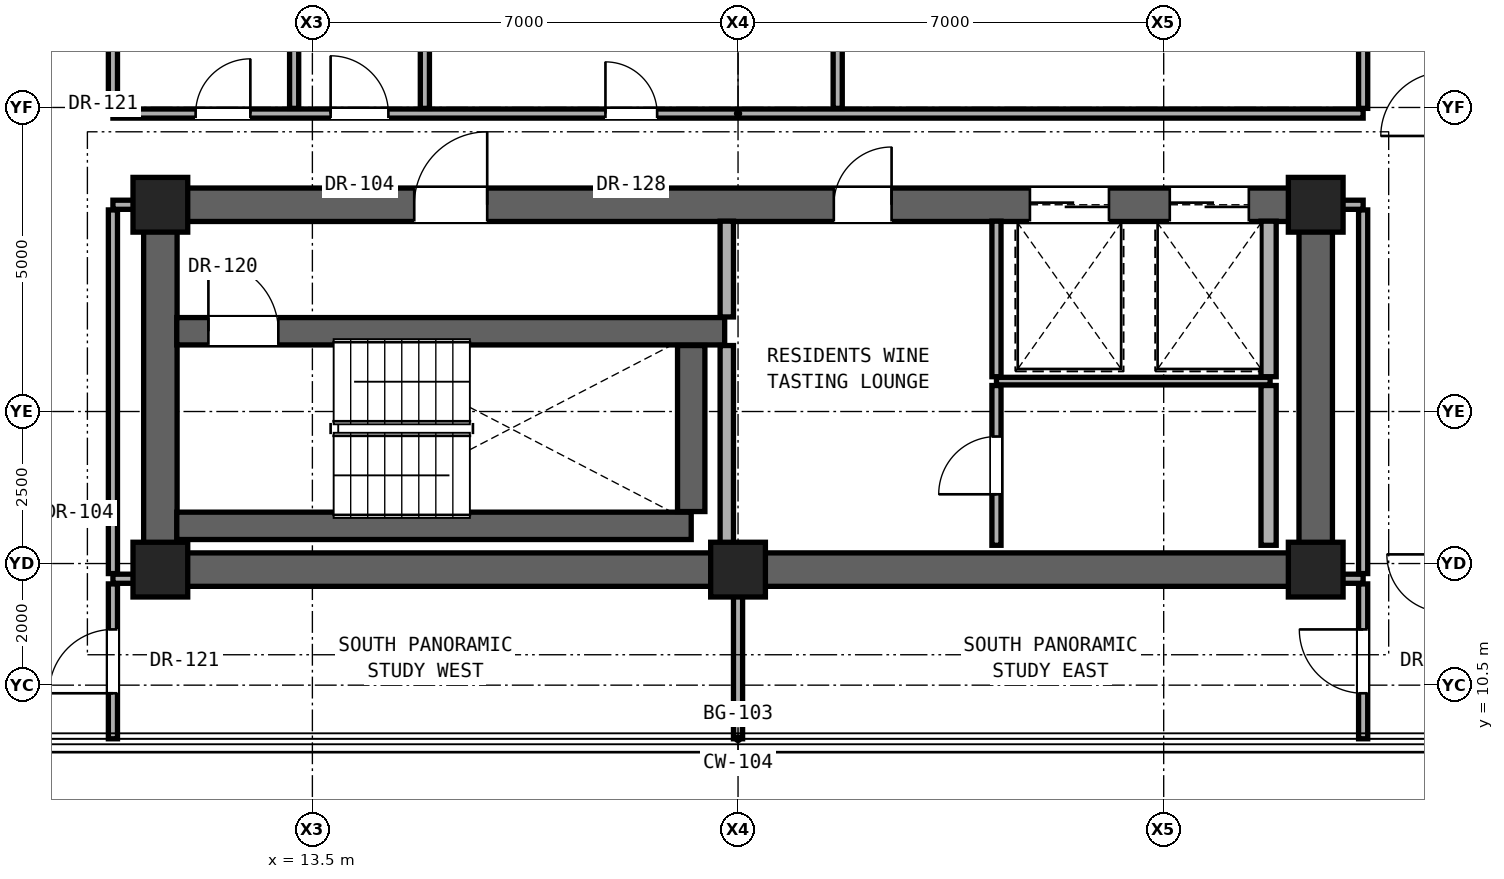
"""IFC4 building model, lengths in metres.
Left out: names, types, materials, properties, quantities, classifications, styles, units other than length and angle.
Written with IfcOpenShell. Run it as: python <this file> out.ifc"""

import sys

from ifc_helpers import new_model, si_unit, direction, frame, frame_2d, origin, origin_2d, place, context, subcontext, project, spatial, rectangle, extrude, element, fill, save


model = new_model("IFC4")
c1 = context("Model", 3, precision=1e-05, world=origin(), true_north=direction((0.0, 1.0)))
c2 = subcontext(c1, "Body", "Model", "MODEL_VIEW")
j1 = project(units=[si_unit("LENGTHUNIT", "METRE"), si_unit("PLANEANGLEUNIT", "RADIAN")], contexts=[c1])
p1 = place(None, origin())
s1 = spatial("IfcSite", under=j1, at=p1, CompositionType="ELEMENT")
p2 = place(p1, origin())
s2 = spatial("IfcBuilding", under=s1, at=p2, CompositionType="ELEMENT")
p3 = place(p2, frame((0.0, 0.0, 196.65)))
s3 = spatial("IfcBuildingStorey", under=s2, at=p3, CompositionType="ELEMENT", Elevation=196.65)
for number, where, z_axis, x_axis in (
    (1, (11.0, 12.4, 0.0), (0.0, 0.0, 1.0), (1.0, 0.0, 0.0)),
    (2, (20.5, 12.4, 0.0), (0.0, 0.0, 1.0), (1.0, 0.0, 0.0)),
    (3, (30.0, 12.4, 0.0), (0.0, 0.0, 1.0), (1.0, 0.0, 0.0)),
    (4, (11.0, 18.4, 0.0), (0.0, 0.0, 1.0), (1.0, 0.0, 0.0)),
    (5, (30.0, 18.4, 0.0), (0.0, 0.0, 1.0), (1.0, 0.0, 0.0)),
):
    element("IfcColumn", number, at=place(p3, frame(where, z_axis=z_axis, x_axis=x_axis)), inside=s3, PredefinedType="COLUMN", context=c2, shape_type="SweptSolid", body=[
        extrude(rectangle(XDim=0.9, YDim=0.9, at=origin_2d()), origin(), (0.0, 0.0, 1.0), 3.25),
    ])
p4 = place(p3, frame((11.0, 12.4, 0.0), z_axis=(0.0, 0.0, 1.0), x_axis=(1.0, 0.0, 0.0)))
e6 = element("IfcWall", 6, at=p4, inside=s3, PredefinedType="SHEAR", context=c2, shape_type="SweptSolid", body=[
    extrude(rectangle(XDim=19.0, YDim=0.55, at=frame_2d((9.5, 0.0))), origin(), (0.0, 0.0, 1.0), 3.05),
])
for number, where, z_axis, x_axis in (
    (7, (11.0, 12.4, 0.0), (0.0, 0.0, 1.0), (0.0, 1.0, 0.0)),
    (8, (30.0, 12.4, 0.0), (0.0, 0.0, 1.0), (0.0, 1.0, 0.0)),
):
    element("IfcWall", number, at=place(p3, frame(where, z_axis=z_axis, x_axis=x_axis)), inside=s3, PredefinedType="SHEAR", context=c2, shape_type="SweptSolid", body=[
        extrude(rectangle(XDim=6.0, YDim=0.55, at=frame_2d((3.0, 0.0))), origin(), (0.0, 0.0, 1.0), 3.05),
    ])
p5 = place(p3, frame((11.0, 18.4, 0.0), z_axis=(0.0, 0.0, 1.0), x_axis=(1.0, 0.0, 0.0)))
e9 = element("IfcWall", 9, at=p5, inside=s3, PredefinedType="SHEAR", context=c2, shape_type="SweptSolid", body=[
    extrude(rectangle(XDim=19.0, YDim=0.55, at=frame_2d((9.5, 0.0))), origin(), (0.0, 0.0, 1.0), 3.05),
])
p6 = place(p5, frame((4.175, 0.0, 0.0)))
e10 = element("IfcOpeningElement", 10, at=p6, cuts=e9, PredefinedType="OPENING", context=c2, shape_type="SweptSolid", body=[
    extrude(rectangle(XDim=1.2, YDim=2.25, at=frame_2d((0.6, 1.125))), frame((0.0, 0.285, 0.0), z_axis=(0.0, -1.0, 0.0), x_axis=(1.0, 0.0, 0.0)), (0.0, 0.0, 1.0), 0.57),
])
p7 = place(p5, frame((11.075, 0.0, 0.0)))
e11 = element("IfcOpeningElement", 11, at=p7, cuts=e9, PredefinedType="OPENING", context=c2, shape_type="SweptSolid", body=[
    extrude(rectangle(XDim=0.95, YDim=2.15, at=frame_2d((0.475, 1.075))), frame((0.0, 0.285, 0.0), z_axis=(0.0, -1.0, 0.0), x_axis=(1.0, 0.0, 0.0)), (0.0, 0.0, 1.0), 0.57),
])
p8 = place(p5, frame((14.3, 0.0, 0.0)))
e12 = element("IfcOpeningElement", 12, at=p8, cuts=e9, PredefinedType="OPENING", context=c2, shape_type="SweptSolid", body=[
    extrude(rectangle(XDim=1.3, YDim=2.3, at=frame_2d((0.65, 1.15))), frame((0.0, 0.285, 0.0), z_axis=(0.0, -1.0, 0.0), x_axis=(1.0, 0.0, 0.0)), (0.0, 0.0, 1.0), 0.57),
])
p9 = place(p5, frame((16.6, 0.0, 0.0)))
e13 = element("IfcOpeningElement", 13, at=p9, cuts=e9, PredefinedType="OPENING", context=c2, shape_type="SweptSolid", body=[
    extrude(rectangle(XDim=1.3, YDim=2.3, at=frame_2d((0.65, 1.15))), frame((0.0, 0.285, 0.0), z_axis=(0.0, -1.0, 0.0), x_axis=(1.0, 0.0, 0.0)), (0.0, 0.0, 1.0), 0.57),
])
for number, where, z_axis, x_axis in (
    (14, (10.22, 12.25, 0.0), (0.0, 0.0, 1.0), (1.0, 0.0, 0.0)),
    (15, (30.27, 12.25, 0.0), (0.0, 0.0, 1.0), (1.0, 0.0, 0.0)),
):
    element("IfcWall", number, at=place(p3, frame(where, z_axis=z_axis, x_axis=x_axis)), inside=s3, PredefinedType="PARTITIONING", context=c2, shape_type="SweptSolid", body=[
        extrude(rectangle(XDim=0.51, YDim=0.15, at=frame_2d((0.255, 0.0))), origin(), (0.0, 0.0, 1.0), 3.05),
    ])
p10 = place(p3, frame((11.27, 13.12, 0.0), z_axis=(0.0, 0.0, 1.0), x_axis=(1.0, 0.0, 0.0)))
e16 = element("IfcWall", 16, at=p10, inside=s3, PredefinedType="SHEAR", context=c2, shape_type="SweptSolid", body=[
    extrude(rectangle(XDim=8.46, YDim=0.45, at=frame_2d((4.23, 0.0))), origin(), (0.0, 0.0, 1.0), 3.05),
])
p11 = place(p3, frame((24.75, 15.5, 0.0), z_axis=(0.0, 0.0, 1.0), x_axis=(1.0, 0.0, 0.0)))
e17 = element("IfcWall", 17, at=p11, inside=s3, PredefinedType="PARTITIONING", context=c2, shape_type="SweptSolid", body=[
    extrude(rectangle(XDim=4.5, YDim=0.125, at=frame_2d((2.25, 0.0))), origin(), (0.0, 0.0, 1.0), 3.05),
])
p12 = place(p3, frame((11.27, 16.32, 0.0), z_axis=(0.0, 0.0, 1.0), x_axis=(1.0, 0.0, 0.0)))
e18 = element("IfcWall", 18, at=p12, inside=s3, PredefinedType="SHEAR", context=c2, shape_type="SweptSolid", body=[
    extrude(rectangle(XDim=9.01, YDim=0.45, at=frame_2d((4.505, 0.0))), origin(), (0.0, 0.0, 1.0), 3.05),
])
p13 = place(p12, frame((0.52, 0.0, 0.0)))
e19 = element("IfcOpeningElement", 19, at=p13, cuts=e18, PredefinedType="OPENING", context=c2, shape_type="SweptSolid", body=[
    extrude(rectangle(XDim=1.15, YDim=2.2, at=frame_2d((0.575, 1.1))), frame((0.0, 0.235, 0.0), z_axis=(0.0, -1.0, 0.0), x_axis=(1.0, 0.0, 0.0)), (0.0, 0.0, 1.0), 0.47),
])
for number, where, z_axis, x_axis in (
    (20, (10.22, 18.4, 0.0), (0.0, 0.0, 1.0), (1.0, 0.0, 0.0)),
    (21, (30.27, 18.4, 0.0), (0.0, 0.0, 1.0), (1.0, 0.0, 0.0)),
):
    element("IfcWall", number, at=place(p3, frame(where, z_axis=z_axis, x_axis=x_axis)), inside=s3, PredefinedType="PARTITIONING", context=c2, shape_type="SweptSolid", body=[
        extrude(rectangle(XDim=0.51, YDim=0.15, at=frame_2d((0.255, 0.0))), origin(), (0.0, 0.0, 1.0), 2.442),
    ])
p14 = place(p3, frame((10.22, 19.9, 0.0), z_axis=(0.0, 0.0, 1.0), x_axis=(1.0, 0.0, 0.0)))
e22 = element("IfcWall", 22, at=p14, inside=s3, PredefinedType="PARTITIONING", context=c2, shape_type="SweptSolid", body=[
    extrude(rectangle(XDim=20.56, YDim=0.15, at=frame_2d((10.28, 0.0))), origin(), (0.0, 0.0, 1.0), 2.186),
])
p15 = place(p14, frame((1.36, 0.0, 0.0)))
e23 = element("IfcOpeningElement", 23, at=p15, cuts=e22, PredefinedType="OPENING", context=c2, shape_type="SweptSolid", body=[
    extrude(rectangle(XDim=0.9, YDim=2.1, at=frame_2d((0.45, 1.05))), frame((0.0, 0.085, 0.0), z_axis=(0.0, -1.0, 0.0), x_axis=(1.0, 0.0, 0.0)), (0.0, 0.0, 1.0), 0.17),
])
p16 = place(p14, frame((3.58, 0.0, 0.0)))
e24 = element("IfcOpeningElement", 24, at=p16, cuts=e22, PredefinedType="OPENING", context=c2, shape_type="SweptSolid", body=[
    extrude(rectangle(XDim=0.95, YDim=2.15, at=frame_2d((0.475, 1.075))), frame((0.0, 0.085, 0.0), z_axis=(0.0, -1.0, 0.0), x_axis=(1.0, 0.0, 0.0)), (0.0, 0.0, 1.0), 0.17),
])
p17 = place(p14, frame((8.1, 0.0, 0.0)))
e25 = element("IfcOpeningElement", 25, at=p17, cuts=e22, PredefinedType="OPENING", context=c2, shape_type="SweptSolid", body=[
    extrude(rectangle(XDim=0.85, YDim=2.01, at=frame_2d((0.425, 1.005))), frame((0.0, 0.085, 0.0), z_axis=(0.0, -1.0, 0.0), x_axis=(1.0, 0.0, 0.0)), (0.0, 0.0, 1.0), 0.17),
])
p18 = place(p3, frame((10.22, 9.618, 0.0), z_axis=(0.0, 0.0, 1.0), x_axis=(0.0, 1.0, 0.0)))
e26 = element("IfcWall", 26, at=p18, inside=s3, PredefinedType="PARTITIONING", context=c2, shape_type="SweptSolid", body=[
    extrude(rectangle(XDim=2.547, YDim=0.15, at=frame_2d((1.273, 0.0))), origin(), (0.0, 0.0, 1.0), 3.05),
])
p19 = place(p18, frame((0.749, 0.0, 0.0)))
e27 = element("IfcOpeningElement", 27, at=p19, cuts=e26, PredefinedType="OPENING", context=c2, shape_type="SweptSolid", body=[
    extrude(rectangle(XDim=1.05, YDim=2.2, at=frame_2d((0.525, 1.1))), frame((0.0, 0.085, 0.0), z_axis=(0.0, -1.0, 0.0), x_axis=(1.0, 0.0, 0.0)), (0.0, 0.0, 1.0), 0.17),
])
p20 = place(p3, frame((10.22, 12.335, 0.0), z_axis=(0.0, 0.0, 1.0), x_axis=(0.0, 1.0, 0.0)))
e28 = element("IfcWall", 28, at=p20, inside=s3, PredefinedType="PARTITIONING", context=c2, shape_type="SweptSolid", body=[
    extrude(rectangle(XDim=5.98, YDim=0.15, at=frame_2d((2.99, 0.0))), origin(), (0.0, 0.0, 1.0), 2.442),
])
for number, where, z_axis, x_axis in (
    (29, (10.22, 19.985, 0.0), (0.0, 0.0, 1.0), (0.0, 1.0, 0.0)),
    (30, (13.2, 19.985, 0.0), (0.0, 0.0, 1.0), (0.0, 1.0, 0.0)),
    (31, (15.35, 19.985, 0.0), (0.0, 0.0, 1.0), (0.0, 1.0, 0.0)),
):
    element("IfcWall", number, at=place(p3, frame(where, z_axis=z_axis, x_axis=x_axis)), inside=s3, PredefinedType="PARTITIONING", context=c2, shape_type="SweptSolid", body=[
        extrude(rectangle(XDim=2.78, YDim=0.15, at=frame_2d((1.39, 0.0))), origin(), (0.0, 0.0, 1.0), 3.05),
    ])
p21 = place(p3, frame((19.73, 13.355, 0.0), z_axis=(0.0, 0.0, 1.0), x_axis=(0.0, 1.0, 0.0)))
e32 = element("IfcWall", 32, at=p21, inside=s3, PredefinedType="SHEAR", context=c2, shape_type="SweptSolid", body=[
    extrude(rectangle(XDim=2.73, YDim=0.45, at=frame_2d((1.365, 0.0))), origin(), (0.0, 0.0, 1.0), 3.05),
])
p22 = place(p3, frame((20.315, 12.8, 0.0), z_axis=(0.0, 0.0, 1.0), x_axis=(0.0, 1.0, 0.0)))
e33 = element("IfcWall", 33, at=p22, inside=s3, PredefinedType="SOLIDWALL", context=c2, shape_type="SweptSolid", body=[
    extrude(rectangle(XDim=3.285, YDim=0.22, at=frame_2d((1.643, 0.0))), origin(), (0.0, 0.0, 1.0), 3.05),
])
p23 = place(p3, frame((20.315, 16.555, 0.0), z_axis=(0.0, 0.0, 1.0), x_axis=(0.0, 1.0, 0.0)))
e34 = element("IfcWall", 34, at=p23, inside=s3, PredefinedType="SOLIDWALL", context=c2, shape_type="SweptSolid", body=[
    extrude(rectangle(XDim=1.575, YDim=0.22, at=frame_2d((0.788, 0.0))), origin(), (0.0, 0.0, 1.0), 3.05),
])
p24 = place(p3, frame((20.5, 9.618, 0.0), z_axis=(0.0, 0.0, 1.0), x_axis=(0.0, 1.0, 0.0)))
e35 = element("IfcWall", 35, at=p24, inside=s3, PredefinedType="PARTITIONING", context=c2, shape_type="SweptSolid", body=[
    extrude(rectangle(XDim=2.512, YDim=0.15, at=frame_2d((1.256, 0.0))), origin(), (0.0, 0.0, 1.0), 3.05),
])
p25 = place(p3, frame((22.139, 19.985, 0.0), z_axis=(0.0, 0.0, 1.0), x_axis=(0.0, 1.0, 0.0)))
e36 = element("IfcWall", 36, at=p25, inside=s3, PredefinedType="PARTITIONING", context=c2, shape_type="SweptSolid", body=[
    extrude(rectangle(XDim=13.03, YDim=0.15, at=frame_2d((6.515, 0.0))), origin(), (0.0, 0.0, 1.0), 2.186),
])
p26 = place(p3, frame((24.75, 12.8, 0.0), z_axis=(0.0, 0.0, 1.0), x_axis=(0.0, 1.0, 0.0)))
e37 = element("IfcWall", 37, at=p26, inside=s3, PredefinedType="PARTITIONING", context=c2, shape_type="SweptSolid", body=[
    extrude(rectangle(XDim=2.627, YDim=0.15, at=frame_2d((1.314, 0.0))), origin(), (0.0, 0.0, 1.0), 3.05),
])
p27 = place(p26, frame((0.839, 0.0, 0.0)))
e38 = element("IfcOpeningElement", 38, at=p27, cuts=e37, PredefinedType="OPENING", context=c2, shape_type="SweptSolid", body=[
    extrude(rectangle(XDim=0.95, YDim=2.15, at=frame_2d((0.475, 1.075))), frame((0.0, 0.085, 0.0), z_axis=(0.0, -1.0, 0.0), x_axis=(1.0, 0.0, 0.0)), (0.0, 0.0, 1.0), 0.17),
])
p28 = place(p3, frame((24.75, 15.573, 0.0), z_axis=(0.0, 0.0, 1.0), x_axis=(0.0, 1.0, 0.0)))
e39 = element("IfcWall", 39, at=p28, inside=s3, PredefinedType="PARTITIONING", context=c2, shape_type="SweptSolid", body=[
    extrude(rectangle(XDim=2.557, YDim=0.15, at=frame_2d((1.279, 0.0))), origin(), (0.0, 0.0, 1.0), 3.05),
])
p29 = place(p3, frame((29.225, 12.8, 0.0), z_axis=(0.0, 0.0, 1.0), x_axis=(0.0, 1.0, 0.0)))
e40 = element("IfcWall", 40, at=p29, inside=s3, PredefinedType="SOLIDWALL", context=c2, shape_type="SweptSolid", body=[
    extrude(rectangle(XDim=2.627, YDim=0.25, at=frame_2d((1.314, 0.0))), origin(), (0.0, 0.0, 1.0), 3.05),
])
p30 = place(p3, frame((29.225, 15.573, 0.0), z_axis=(0.0, 0.0, 1.0), x_axis=(0.0, 1.0, 0.0)))
e41 = element("IfcWall", 41, at=p30, inside=s3, PredefinedType="SOLIDWALL", context=c2, shape_type="SweptSolid", body=[
    extrude(rectangle(XDim=2.557, YDim=0.25, at=frame_2d((1.279, 0.0))), origin(), (0.0, 0.0, 1.0), 3.05),
])
p31 = place(p3, frame((30.78, 9.618, 0.0), z_axis=(0.0, 0.0, 1.0), x_axis=(0.0, 1.0, 0.0)))
e42 = element("IfcWall", 42, at=p31, inside=s3, PredefinedType="PARTITIONING", context=c2, shape_type="SweptSolid", body=[
    extrude(rectangle(XDim=2.547, YDim=0.15, at=frame_2d((1.273, 0.0))), origin(), (0.0, 0.0, 1.0), 3.05),
])
p32 = place(p31, frame((0.749, 0.0, 0.0)))
e43 = element("IfcOpeningElement", 43, at=p32, cuts=e42, PredefinedType="OPENING", context=c2, shape_type="SweptSolid", body=[
    extrude(rectangle(XDim=1.05, YDim=2.2, at=frame_2d((0.525, 1.1))), frame((0.0, 0.085, 0.0), z_axis=(0.0, -1.0, 0.0), x_axis=(1.0, 0.0, 0.0)), (0.0, 0.0, 1.0), 0.17),
])
p33 = place(p3, frame((30.78, 12.335, 0.0), z_axis=(0.0, 0.0, 1.0), x_axis=(0.0, 1.0, 0.0)))
e44 = element("IfcWall", 44, at=p33, inside=s3, PredefinedType="PARTITIONING", context=c2, shape_type="SweptSolid", body=[
    extrude(rectangle(XDim=5.98, YDim=0.15, at=frame_2d((2.99, 0.0))), origin(), (0.0, 0.0, 1.0), 2.442),
])
p34 = place(p3, frame((30.78, 19.985, 0.0), z_axis=(0.0, 0.0, 1.0), x_axis=(0.0, 1.0, 0.0)))
e45 = element("IfcWall", 45, at=p34, inside=s3, PredefinedType="PARTITIONING", context=c2, shape_type="SweptSolid", body=[
    extrude(rectangle(XDim=13.03, YDim=0.15, at=frame_2d((6.515, 0.0))), origin(), (0.0, 0.0, 1.0), 2.346),
])
p35 = place(p6, origin())
e46 = element("IfcDoor", 46, at=p35, inside=s3, OperationType="SINGLE_SWING_RIGHT", PredefinedType="DOOR", context=c2, shape_type="SweptSolid", body=[
    extrude(rectangle(XDim=1.2, YDim=2.25, at=frame_2d((0.6, 1.125))), frame((0.0, 0.025, 0.0), z_axis=(0.0, -1.0, 0.0), x_axis=(1.0, 0.0, 0.0)), (0.0, 0.0, 1.0), 0.05),
])
fill(e10, e46)
p36 = place(p13, origin())
e47 = element("IfcDoor", 47, at=p36, inside=s3, OperationType="SINGLE_SWING_LEFT", PredefinedType="DOOR", context=c2, shape_type="SweptSolid", body=[
    extrude(rectangle(XDim=1.15, YDim=2.2, at=frame_2d((0.575, 1.1))), frame((0.0, 0.025, 0.0), z_axis=(0.0, -1.0, 0.0), x_axis=(1.0, 0.0, 0.0)), (0.0, 0.0, 1.0), 0.05),
])
fill(e19, e47)
p37 = place(p7, origin())
e48 = element("IfcDoor", 48, at=p37, inside=s3, OperationType="SINGLE_SWING_RIGHT", PredefinedType="DOOR", context=c2, shape_type="SweptSolid", body=[
    extrude(rectangle(XDim=0.95, YDim=2.15, at=frame_2d((0.475, 1.075))), frame((0.0, 0.025, 0.0), z_axis=(0.0, -1.0, 0.0), x_axis=(1.0, 0.0, 0.0)), (0.0, 0.0, 1.0), 0.05),
])
fill(e11, e48)
p38 = place(p27, origin())
e49 = element("IfcDoor", 49, at=p38, inside=s3, OperationType="SINGLE_SWING_LEFT", PredefinedType="DOOR", context=c2, shape_type="SweptSolid", body=[
    extrude(rectangle(XDim=0.95, YDim=2.15, at=frame_2d((0.475, 1.075))), frame((0.0, 0.025, 0.0), z_axis=(0.0, -1.0, 0.0), x_axis=(1.0, 0.0, 0.0)), (0.0, 0.0, 1.0), 0.05),
])
fill(e38, e49)
p39 = place(p15, origin())
e50 = element("IfcDoor", 50, at=p39, inside=s3, OperationType="SINGLE_SWING_RIGHT", PredefinedType="DOOR", context=c2, shape_type="SweptSolid", body=[
    extrude(rectangle(XDim=0.9, YDim=2.1, at=frame_2d((0.45, 1.05))), frame((0.0, 0.025, 0.0), z_axis=(0.0, -1.0, 0.0), x_axis=(1.0, 0.0, 0.0)), (0.0, 0.0, 1.0), 0.05),
])
fill(e23, e50)
p40 = place(p16, origin())
e51 = element("IfcDoor", 51, at=p40, inside=s3, OperationType="SINGLE_SWING_LEFT", PredefinedType="DOOR", context=c2, shape_type="SweptSolid", body=[
    extrude(rectangle(XDim=0.95, YDim=2.15, at=frame_2d((0.475, 1.075))), frame((0.0, 0.025, 0.0), z_axis=(0.0, -1.0, 0.0), x_axis=(1.0, 0.0, 0.0)), (0.0, 0.0, 1.0), 0.05),
])
fill(e24, e51)
p41 = place(p17, origin())
e52 = element("IfcDoor", 52, at=p41, inside=s3, OperationType="SINGLE_SWING_LEFT", PredefinedType="DOOR", context=c2, shape_type="SweptSolid", body=[
    extrude(rectangle(XDim=0.85, YDim=2.01, at=frame_2d((0.425, 1.005))), frame((0.0, 0.025, 0.0), z_axis=(0.0, -1.0, 0.0), x_axis=(1.0, 0.0, 0.0)), (0.0, 0.0, 1.0), 0.05),
])
fill(e25, e52)
p42 = place(p19, origin())
e53 = element("IfcDoor", 53, at=p42, inside=s3, OperationType="SINGLE_SWING_LEFT", PredefinedType="DOOR", context=c2, shape_type="SweptSolid", body=[
    extrude(rectangle(XDim=1.05, YDim=2.2, at=frame_2d((0.525, 1.1))), frame((0.0, 0.025, 0.0), z_axis=(0.0, -1.0, 0.0), x_axis=(1.0, 0.0, 0.0)), (0.0, 0.0, 1.0), 0.05),
])
fill(e27, e53)
p43 = place(p32, origin())
e54 = element("IfcDoor", 54, at=p43, inside=s3, OperationType="SINGLE_SWING_RIGHT", PredefinedType="DOOR", context=c2, shape_type="SweptSolid", body=[
    extrude(rectangle(XDim=1.05, YDim=2.2, at=frame_2d((0.525, 1.1))), frame((0.0, 0.025, 0.0), z_axis=(0.0, -1.0, 0.0), x_axis=(1.0, 0.0, 0.0)), (0.0, 0.0, 1.0), 0.05),
])
fill(e43, e54)
p44 = place(p8, origin())
e55 = element("IfcDoor", 55, at=p44, inside=s3, OperationType="DOUBLE_DOOR_SLIDING", PredefinedType="DOOR", context=c2, shape_type="SweptSolid", body=[
    extrude(rectangle(XDim=1.3, YDim=2.3, at=frame_2d((0.65, 1.15))), frame((0.0, 0.025, 0.0), z_axis=(0.0, -1.0, 0.0), x_axis=(1.0, 0.0, 0.0)), (0.0, 0.0, 1.0), 0.05),
])
fill(e12, e55)
p45 = place(p9, origin())
e56 = element("IfcDoor", 56, at=p45, inside=s3, OperationType="DOUBLE_DOOR_SLIDING", PredefinedType="DOOR", context=c2, shape_type="SweptSolid", body=[
    extrude(rectangle(XDim=1.3, YDim=2.3, at=frame_2d((0.65, 1.15))), frame((0.0, 0.025, 0.0), z_axis=(0.0, -1.0, 0.0), x_axis=(1.0, 0.0, 0.0)), (0.0, 0.0, 1.0), 0.05),
])
fill(e13, e56)
save(model, sys.argv[1])
